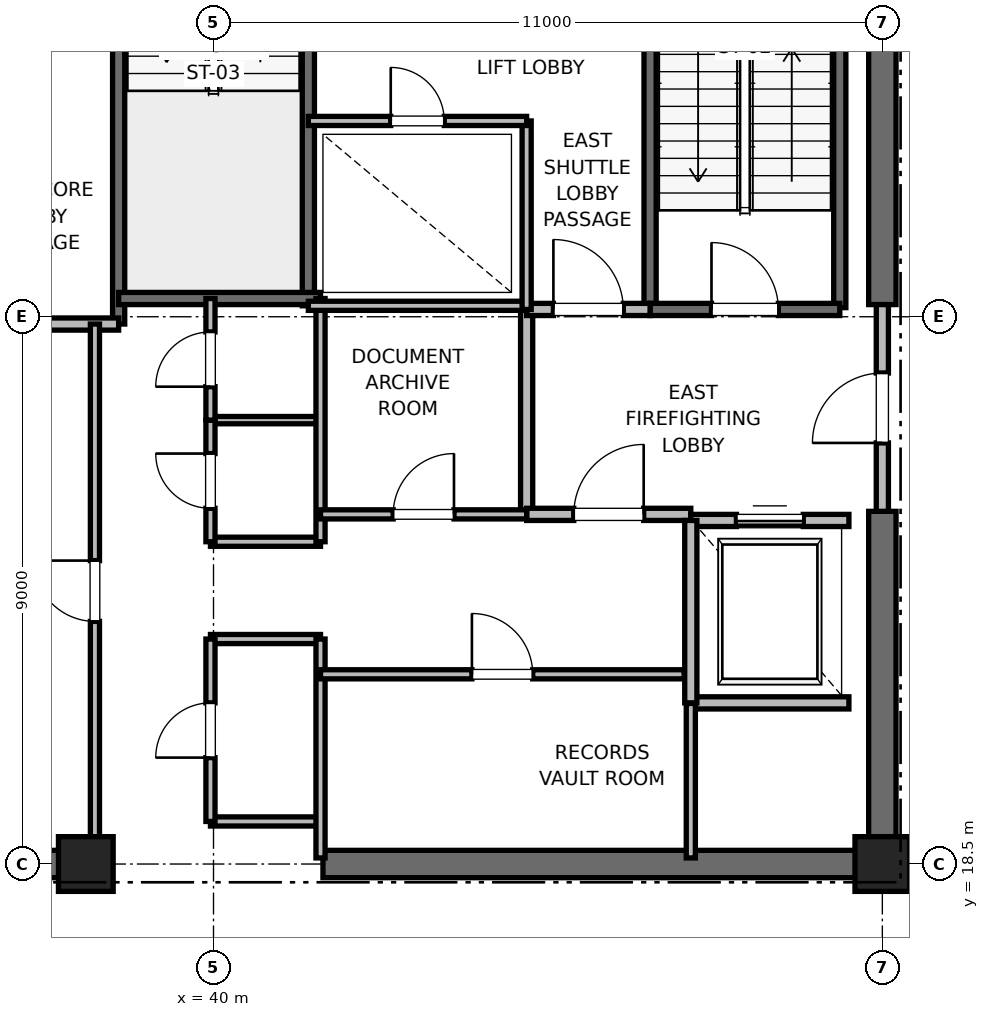
"""IFC4 building model, lengths in metres.
Left out: names, types, materials, properties, quantities, classifications, styles, units other than length and angle.
Written with IfcOpenShell. Run it as: python <this file> out.ifc"""

import sys

from ifc_helpers import new_model, si_unit, direction, frame, frame_2d, origin, origin_2d, place, context, subcontext, project, spatial, rectangle, extrude, element, fill, save


model = new_model("IFC4")
c1 = context("Model", 3, precision=1e-05, world=origin(), true_north=direction((0.0, 1.0)))
c2 = subcontext(c1, "Body", "Model", "MODEL_VIEW")
j1 = project(units=[si_unit("LENGTHUNIT", "METRE"), si_unit("PLANEANGLEUNIT", "RADIAN")], contexts=[c1])
p1 = place(None, origin())
s1 = spatial("IfcSite", under=j1, at=p1, CompositionType="ELEMENT")
p2 = place(p1, origin())
s2 = spatial("IfcBuilding", under=s1, at=p2, CompositionType="ELEMENT")
p3 = place(p2, frame((0.0, 0.0, 251.2)))
s3 = spatial("IfcBuildingStorey", under=s2, at=p3, CompositionType="ELEMENT", Elevation=251.2)
for number, where, z_axis, x_axis in (
    (1, (51.0, 18.5, 0.0), (0.0, 0.0, 1.0), (1.0, 0.0, 0.0)),
    (2, (37.9, 18.5, 0.0), (0.0, 0.0, 1.0), (1.0, 0.0, 0.0)),
):
    element("IfcColumn", number, at=place(p3, frame(where, z_axis=z_axis, x_axis=x_axis)), inside=s3, PredefinedType="PILASTER", context=c2, shape_type="SweptSolid", body=[
        extrude(rectangle(XDim=0.9, YDim=0.9, at=origin_2d()), origin(), (0.0, 0.0, 1.0), 4.0),
    ])
for number, where, z_axis, x_axis in (
    (3, (29.0, 18.5, 0.0), (0.0, 0.0, 1.0), (1.0, 0.0, 0.0)),
    (4, (41.8, 18.5, 0.0), (0.0, 0.0, 1.0), (1.0, 0.0, 0.0)),
):
    element("IfcWall", number, at=place(p3, frame(where, z_axis=z_axis, x_axis=x_axis)), inside=s3, PredefinedType="SHEAR", context=c2, shape_type="SweptSolid", body=[
        extrude(rectangle(XDim=9.2, YDim=0.45, at=frame_2d((4.6, 0.0))), origin(), (0.0, 0.0, 1.0), 3.785),
    ])
p4 = place(p3, frame((51.0, 18.5, 0.0), z_axis=(0.0, 0.0, 1.0), x_axis=(0.0, 1.0, 0.0)))
e5 = element("IfcWall", 5, at=p4, inside=s3, PredefinedType="SHEAR", context=c2, shape_type="SweptSolid", body=[
    extrude(rectangle(XDim=5.8, YDim=0.45, at=frame_2d((2.9, 0.0))), origin(), (0.0, 0.0, 1.0), 3.785),
])
p5 = place(p3, frame((51.0, 27.7, 0.0), z_axis=(0.0, 0.0, 1.0), x_axis=(0.0, 1.0, 0.0)))
e6 = element("IfcWall", 6, at=p5, inside=s3, PredefinedType="SHEAR", context=c2, shape_type="SweptSolid", body=[
    extrude(rectangle(XDim=8.8, YDim=0.45, at=frame_2d((4.4, 0.0))), origin(), (0.0, 0.0, 1.0), 3.785),
])
p6 = place(p3, frame((50.3, 27.65, 0.0), z_axis=(0.0, 0.0, 1.0), x_axis=(0.0, 1.0, 0.0)))
e7 = element("IfcWall", 7, at=p6, inside=s3, PredefinedType="SOLIDWALL", context=c2, shape_type="SweptSolid", body=[
    extrude(rectangle(XDim=8.15, YDim=0.2, at=frame_2d((4.075, 0.0))), origin(), (0.0, 0.0, 1.0), 3.785),
])
p7 = place(p3, frame((47.18, 27.62, 0.0), z_axis=(0.0, 0.0, 1.0), x_axis=(0.0, 1.0, 0.0)))
e8 = element("IfcWall", 8, at=p7, inside=s3, PredefinedType="SOLIDWALL", context=c2, shape_type="SweptSolid", body=[
    extrude(rectangle(XDim=8.18, YDim=0.2, at=frame_2d((4.09, 0.0))), origin(), (0.0, 0.0, 1.0), 3.785),
])
p8 = place(p3, frame((47.18, 27.62, 0.0), z_axis=(0.0, 0.0, 1.0), x_axis=(1.0, 0.0, 0.0)))
e9 = element("IfcWall", 9, at=p8, inside=s3, PredefinedType="SOLIDWALL", context=c2, shape_type="SweptSolid", body=[
    extrude(rectangle(XDim=3.12, YDim=0.2, at=frame_2d((1.56, 0.0))), origin(), (0.0, 0.0, 1.0), 3.785),
])
p9 = place(p8, frame((1.01, 0.0, 0.0)))
e10 = element("IfcOpeningElement", 10, at=p9, cuts=e9, PredefinedType="OPENING", context=c2, shape_type="SweptSolid", body=[
    extrude(rectangle(XDim=1.1, YDim=2.15, at=frame_2d((0.55, 1.075))), frame((0.0, 0.1, 0.0), z_axis=(0.0, -1.0, 0.0), x_axis=(1.0, 0.0, 0.0)), (0.0, 0.0, 1.0), 0.2),
])
p10 = place(p3, frame((38.44, 27.38, 0.0), z_axis=(0.0, 0.0, 1.0), x_axis=(0.0, 1.0, 0.0)))
e11 = element("IfcWall", 11, at=p10, inside=s3, PredefinedType="SOLIDWALL", context=c2, shape_type="SweptSolid", body=[
    extrude(rectangle(XDim=8.87, YDim=0.2, at=frame_2d((4.435, 0.0))), origin(), (0.0, 0.0, 1.0), 3.785),
])
p11 = place(p3, frame((41.56, 27.68, 0.0), z_axis=(0.0, 0.0, 1.0), x_axis=(0.0, 1.0, 0.0)))
e12 = element("IfcWall", 12, at=p11, inside=s3, PredefinedType="SOLIDWALL", context=c2, shape_type="SweptSolid", body=[
    extrude(rectangle(XDim=8.57, YDim=0.2, at=frame_2d((4.285, 0.0))), origin(), (0.0, 0.0, 1.0), 3.785),
])
p12 = place(p3, frame((38.44, 27.8, 0.0), z_axis=(0.0, 0.0, 1.0), x_axis=(1.0, 0.0, 0.0)))
e13 = element("IfcWall", 13, at=p12, inside=s3, PredefinedType="SOLIDWALL", context=c2, shape_type="SweptSolid", body=[
    extrude(rectangle(XDim=3.32, YDim=0.2, at=frame_2d((1.66, 0.0))), origin(), (0.0, 0.0, 1.0), 3.785),
])
p13 = place(p3, frame((32.82, 27.38, 0.0), z_axis=(0.0, 0.0, 1.0), x_axis=(1.0, 0.0, 0.0)))
e14 = element("IfcWall", 14, at=p13, inside=s3, PredefinedType="PARTITIONING", context=c2, shape_type="SweptSolid", body=[
    extrude(rectangle(XDim=5.62, YDim=0.2, at=frame_2d((2.81, 0.0))), origin(), (0.0, 0.0, 1.0), 3.785),
])
p14 = place(p3, frame((45.15, 24.25, 0.0), z_axis=(0.0, 0.0, 1.0), x_axis=(0.0, 1.0, 0.0)))
e15 = element("IfcWall", 15, at=p14, inside=s3, PredefinedType="PARTITIONING", context=c2, shape_type="SweptSolid", body=[
    extrude(rectangle(XDim=3.37, YDim=0.2, at=frame_2d((1.685, 0.0))), origin(), (0.0, 0.0, 1.0), 3.785),
])
p15 = place(p3, frame((45.15, 24.25, 0.0), z_axis=(0.0, 0.0, 1.0), x_axis=(1.0, 0.0, 0.0)))
e16 = element("IfcWall", 16, at=p15, inside=s3, PredefinedType="PARTITIONING", context=c2, shape_type="SweptSolid", body=[
    extrude(rectangle(XDim=2.7, YDim=0.2, at=frame_2d((1.35, 0.0))), origin(), (0.0, 0.0, 1.0), 3.785),
])
p16 = place(p15, frame((0.775, 0.0, 0.0)))
e17 = element("IfcOpeningElement", 17, at=p16, cuts=e16, PredefinedType="OPENING", context=c2, shape_type="SweptSolid", body=[
    extrude(rectangle(XDim=1.15, YDim=2.2, at=frame_2d((0.575, 1.1))), frame((0.0, 0.1, 0.0), z_axis=(0.0, -1.0, 0.0), x_axis=(1.0, 0.0, 0.0)), (0.0, 0.0, 1.0), 0.2),
])
p17 = place(p3, frame((45.15, 27.62, 0.0), z_axis=(0.0, 0.0, 1.0), x_axis=(1.0, 0.0, 0.0)))
e18 = element("IfcWall", 18, at=p17, inside=s3, PredefinedType="PARTITIONING", context=c2, shape_type="SweptSolid", body=[
    extrude(rectangle(XDim=2.03, YDim=0.2, at=frame_2d((1.015, 0.0))), origin(), (0.0, 0.0, 1.0), 3.785),
])
p18 = place(p17, frame((0.44, 0.0, 0.0)))
e19 = element("IfcOpeningElement", 19, at=p18, cuts=e18, PredefinedType="OPENING", context=c2, shape_type="SweptSolid", body=[
    extrude(rectangle(XDim=1.15, YDim=2.2, at=frame_2d((0.575, 1.1))), frame((0.0, 0.1, 0.0), z_axis=(0.0, -1.0, 0.0), x_axis=(1.0, 0.0, 0.0)), (0.0, 0.0, 1.0), 0.2),
])
p19 = place(p3, frame((51.0, 24.3, 0.0), z_axis=(0.0, 0.0, 1.0), x_axis=(0.0, 1.0, 0.0)))
e20 = element("IfcWall", 20, at=p19, inside=s3, PredefinedType="PARTITIONING", context=c2, shape_type="SweptSolid", body=[
    extrude(rectangle(XDim=3.4, YDim=0.2, at=frame_2d((1.7, 0.0))), origin(), (0.0, 0.0, 1.0), 2.865),
])
p20 = place(p19, frame((1.125, 0.0, 0.0)))
e21 = element("IfcOpeningElement", 21, at=p20, cuts=e20, PredefinedType="OPENING", context=c2, shape_type="SweptSolid", body=[
    extrude(rectangle(XDim=1.15, YDim=2.2, at=frame_2d((0.575, 1.1))), frame((0.0, 0.1, 0.0), z_axis=(0.0, -1.0, 0.0), x_axis=(1.0, 0.0, 0.0)), (0.0, 0.0, 1.0), 0.2),
])
p21 = place(p3, frame((47.85, 21.15, 0.0), z_axis=(0.0, 0.0, 1.0), x_axis=(1.0, 0.0, 0.0)))
e22 = element("IfcWall", 22, at=p21, inside=s3, PredefinedType="SOLIDWALL", context=c2, shape_type="SweptSolid", body=[
    extrude(rectangle(XDim=2.6, YDim=0.2, at=frame_2d((1.3, 0.0))), origin(), (0.0, 0.0, 1.0), 3.785),
])
p22 = place(p3, frame((50.45, 24.15, 0.0), z_axis=(0.0, 0.0, 1.0), x_axis=(-1.0, 0.0, 0.0)))
e23 = element("IfcWall", 23, at=p22, inside=s3, PredefinedType="SOLIDWALL", context=c2, shape_type="SweptSolid", body=[
    extrude(rectangle(XDim=2.6, YDim=0.2, at=frame_2d((1.3, 0.0))), origin(), (0.0, 0.0, 1.0), 2.865),
])
p23 = place(p22, frame((0.75, 0.0, 0.0)))
e24 = element("IfcOpeningElement", 24, at=p23, cuts=e23, PredefinedType="OPENING", context=c2, shape_type="SweptSolid", body=[
    extrude(rectangle(XDim=1.1, YDim=2.2, at=frame_2d((0.55, 1.1))), frame((0.0, 0.1, 0.0), z_axis=(0.0, -1.0, 0.0), x_axis=(1.0, 0.0, 0.0)), (0.0, 0.0, 1.0), 0.2),
])
p24 = place(p3, frame((47.85, 24.15, 0.0), z_axis=(0.0, 0.0, 1.0), x_axis=(0.0, -1.0, 0.0)))
e25 = element("IfcWall", 25, at=p24, inside=s3, PredefinedType="SOLIDWALL", context=c2, shape_type="SweptSolid", body=[
    extrude(rectangle(XDim=3.0, YDim=0.2, at=frame_2d((1.5, 0.0))), origin(), (0.0, 0.0, 1.0), 3.785),
])
for number, where, z_axis, x_axis in (
    (26, (39.95, 19.2, 0.0), (0.0, 0.0, 1.0), (1.0, 0.0, 0.0)),
    (27, (39.95, 22.2, 0.0), (0.0, 0.0, 1.0), (1.0, 0.0, 0.0)),
    (28, (39.95, 23.8, 0.0), (0.0, 0.0, 1.0), (1.0, 0.0, 0.0)),
):
    element("IfcWall", number, at=place(p3, frame(where, z_axis=z_axis, x_axis=x_axis)), inside=s3, PredefinedType="PARTITIONING", context=c2, shape_type="SweptSolid", body=[
        extrude(rectangle(XDim=1.81, YDim=0.15, at=frame_2d((0.905, 0.0))), origin(), (0.0, 0.0, 1.0), 2.85),
    ])
p25 = place(p3, frame((39.95, 25.8, 0.0), z_axis=(0.0, 0.0, 1.0), x_axis=(1.0, 0.0, 0.0)))
e29 = element("IfcWall", 29, at=p25, inside=s3, PredefinedType="PARTITIONING", context=c2, shape_type="SweptSolid", body=[
    extrude(rectangle(XDim=1.81, YDim=0.12, at=frame_2d((0.905, 0.0))), origin(), (0.0, 0.0, 1.0), 2.85),
])
p26 = place(p3, frame((41.76, 18.6, 0.0), z_axis=(0.0, 0.0, 1.0), x_axis=(0.0, 1.0, 0.0)))
e30 = element("IfcWall", 30, at=p26, inside=s3, PredefinedType="PARTITIONING", context=c2, shape_type="SweptSolid", body=[
    extrude(rectangle(XDim=3.6, YDim=0.15, at=frame_2d((1.8, 0.0))), origin(), (0.0, 0.0, 1.0), 2.85),
])
p27 = place(p3, frame((41.76, 23.8, 0.0), z_axis=(0.0, 0.0, 1.0), x_axis=(0.0, 1.0, 0.0)))
e31 = element("IfcWall", 31, at=p27, inside=s3, PredefinedType="PARTITIONING", context=c2, shape_type="SweptSolid", body=[
    extrude(rectangle(XDim=4.0, YDim=0.15, at=frame_2d((2.0, 0.0))), origin(), (0.0, 0.0, 1.0), 2.85),
])
p28 = place(p3, frame((39.95, 19.2, 0.0), z_axis=(0.0, 0.0, 1.0), x_axis=(0.0, 1.0, 0.0)))
e32 = element("IfcWall", 32, at=p28, inside=s3, PredefinedType="PARTITIONING", context=c2, shape_type="SweptSolid", body=[
    extrude(rectangle(XDim=3.0, YDim=0.15, at=frame_2d((1.5, 0.0))), origin(), (0.0, 0.0, 1.0), 2.85),
])
p29 = place(p28, frame((1.05, 0.0, 0.0)))
e33 = element("IfcOpeningElement", 33, at=p29, cuts=e32, PredefinedType="OPENING", context=c2, shape_type="SweptSolid", body=[
    extrude(rectangle(XDim=0.9, YDim=2.1, at=frame_2d((0.45, 1.05))), frame((0.0, 0.075, 0.0), z_axis=(0.0, -1.0, 0.0), x_axis=(1.0, 0.0, 0.0)), (0.0, 0.0, 1.0), 0.15),
])
p30 = place(p3, frame((39.95, 23.8, 0.0), z_axis=(0.0, 0.0, 1.0), x_axis=(0.0, 1.0, 0.0)))
e34 = element("IfcWall", 34, at=p30, inside=s3, PredefinedType="PARTITIONING", context=c2, shape_type="SweptSolid", body=[
    extrude(rectangle(XDim=2.0, YDim=0.15, at=frame_2d((1.0, 0.0))), origin(), (0.0, 0.0, 1.0), 2.85),
])
p31 = place(p30, frame((0.55, 0.0, 0.0)))
e35 = element("IfcOpeningElement", 35, at=p31, cuts=e34, PredefinedType="OPENING", context=c2, shape_type="SweptSolid", body=[
    extrude(rectangle(XDim=0.9, YDim=2.1, at=frame_2d((0.45, 1.05))), frame((0.0, 0.075, 0.0), z_axis=(0.0, -1.0, 0.0), x_axis=(1.0, 0.0, 0.0)), (0.0, 0.0, 1.0), 0.15),
])
p32 = place(p3, frame((39.95, 25.8, 0.0), z_axis=(0.0, 0.0, 1.0), x_axis=(0.0, 1.0, 0.0)))
e36 = element("IfcWall", 36, at=p32, inside=s3, PredefinedType="PARTITIONING", context=c2, shape_type="SweptSolid", body=[
    extrude(rectangle(XDim=2.0, YDim=0.15, at=frame_2d((1.0, 0.0))), origin(), (0.0, 0.0, 1.0), 2.85),
])
p33 = place(p32, frame((0.55, 0.0, 0.0)))
e37 = element("IfcOpeningElement", 37, at=p33, cuts=e36, PredefinedType="OPENING", context=c2, shape_type="SweptSolid", body=[
    extrude(rectangle(XDim=0.9, YDim=2.1, at=frame_2d((0.45, 1.05))), frame((0.0, 0.075, 0.0), z_axis=(0.0, -1.0, 0.0), x_axis=(1.0, 0.0, 0.0)), (0.0, 0.0, 1.0), 0.15),
])
p34 = place(p3, frame((38.05, 18.6, 0.0), z_axis=(0.0, 0.0, 1.0), x_axis=(0.0, 1.0, 0.0)))
e38 = element("IfcWall", 38, at=p34, inside=s3, PredefinedType="PARTITIONING", context=c2, shape_type="SweptSolid", body=[
    extrude(rectangle(XDim=8.78, YDim=0.15, at=frame_2d((4.39, 0.0))), origin(), (0.0, 0.0, 1.0), 2.85),
])
p35 = place(p34, frame((3.89, 0.0, 0.0)))
e39 = element("IfcOpeningElement", 39, at=p35, cuts=e38, PredefinedType="OPENING", context=c2, shape_type="SweptSolid", body=[
    extrude(rectangle(XDim=1.0, YDim=2.15, at=frame_2d((0.5, 1.075))), frame((0.0, 0.075, 0.0), z_axis=(0.0, -1.0, 0.0), x_axis=(1.0, 0.0, 0.0)), (0.0, 0.0, 1.0), 0.15),
])
p36 = place(p3, frame((41.56, 27.68, 0.0), z_axis=(0.0, 0.0, 1.0), x_axis=(1.0, 0.0, 0.0)))
e40 = element("IfcWall", 40, at=p36, inside=s3, PredefinedType="PARTITIONING", context=c2, shape_type="SweptSolid", body=[
    extrude(rectangle(XDim=3.59, YDim=0.15, at=frame_2d((1.795, 0.0))), origin(), (0.0, 0.0, 1.0), 2.85),
])
p37 = place(p3, frame((47.85, 18.6, 0.0), z_axis=(0.0, 0.0, 1.0), x_axis=(0.0, 1.0, 0.0)))
e41 = element("IfcWall", 41, at=p37, inside=s3, PredefinedType="PARTITIONING", context=c2, shape_type="SweptSolid", body=[
    extrude(rectangle(XDim=2.54, YDim=0.15, at=frame_2d((1.27, 0.0))), origin(), (0.0, 0.0, 1.0), 2.85),
])
p38 = place(p3, frame((41.76, 21.62, 0.0), z_axis=(0.0, 0.0, 1.0), x_axis=(1.0, 0.0, 0.0)))
e42 = element("IfcWall", 42, at=p38, inside=s3, PredefinedType="PARTITIONING", context=c2, shape_type="SweptSolid", body=[
    extrude(rectangle(XDim=5.98, YDim=0.15, at=frame_2d((2.99, 0.0))), origin(), (0.0, 0.0, 1.0), 2.85),
])
p39 = place(p38, frame((2.49, 0.0, 0.0)))
e43 = element("IfcOpeningElement", 43, at=p39, cuts=e42, PredefinedType="OPENING", context=c2, shape_type="SweptSolid", body=[
    extrude(rectangle(XDim=1.0, YDim=2.15, at=frame_2d((0.5, 1.075))), frame((0.0, 0.075, 0.0), z_axis=(0.0, -1.0, 0.0), x_axis=(1.0, 0.0, 0.0)), (0.0, 0.0, 1.0), 0.15),
])
p40 = place(p3, frame((41.76, 24.25, 0.0), z_axis=(0.0, 0.0, 1.0), x_axis=(1.0, 0.0, 0.0)))
e44 = element("IfcWall", 44, at=p40, inside=s3, PredefinedType="PARTITIONING", context=c2, shape_type="SweptSolid", body=[
    extrude(rectangle(XDim=3.39, YDim=0.15, at=frame_2d((1.695, 0.0))), origin(), (0.0, 0.0, 1.0), 2.85),
])
p41 = place(p40, frame((1.195, 0.0, 0.0)))
e45 = element("IfcOpeningElement", 45, at=p41, cuts=e44, PredefinedType="OPENING", context=c2, shape_type="SweptSolid", body=[
    extrude(rectangle(XDim=1.0, YDim=2.15, at=frame_2d((0.5, 1.075))), frame((0.0, 0.075, 0.0), z_axis=(0.0, -1.0, 0.0), x_axis=(1.0, 0.0, 0.0)), (0.0, 0.0, 1.0), 0.15),
])
p42 = place(p3, frame((45.15, 27.62, 0.0), z_axis=(0.0, 0.0, 1.0), x_axis=(0.0, 1.0, 0.0)))
e46 = element("IfcWall", 46, at=p42, inside=s3, PredefinedType="PARTITIONING", context=c2, shape_type="SweptSolid", body=[
    extrude(rectangle(XDim=3.1, YDim=0.15, at=frame_2d((1.55, 0.0))), origin(), (0.0, 0.0, 1.0), 2.85),
])
p43 = place(p3, frame((41.56, 30.72, 0.0), z_axis=(0.0, 0.0, 1.0), x_axis=(1.0, 0.0, 0.0)))
e47 = element("IfcWall", 47, at=p43, inside=s3, PredefinedType="PARTITIONING", context=c2, shape_type="SweptSolid", body=[
    extrude(rectangle(XDim=3.59, YDim=0.15, at=frame_2d((1.795, 0.0))), origin(), (0.0, 0.0, 1.0), 2.85),
])
p44 = place(p43, frame((1.355, 0.0, 0.0)))
e48 = element("IfcOpeningElement", 48, at=p44, cuts=e47, PredefinedType="OPENING", context=c2, shape_type="SweptSolid", body=[
    extrude(rectangle(XDim=0.88, YDim=2.1, at=frame_2d((0.44, 1.05))), frame((0.0, 0.075, 0.0), z_axis=(0.0, -1.0, 0.0), x_axis=(1.0, 0.0, 0.0)), (0.0, 0.0, 1.0), 0.15),
])
p45 = place(p9, origin())
e49 = element("IfcDoor", 49, at=p45, inside=s3, OperationType="SINGLE_SWING_LEFT", PredefinedType="DOOR", context=c2, shape_type="SweptSolid", body=[
    extrude(rectangle(XDim=1.1, YDim=2.15, at=frame_2d((0.55, 1.075))), frame((0.0, 0.025, 0.0), z_axis=(0.0, -1.0, 0.0), x_axis=(1.0, 0.0, 0.0)), (0.0, 0.0, 1.0), 0.05),
])
fill(e10, e49)
p46 = place(p16, origin())
e50 = element("IfcDoor", 50, at=p46, inside=s3, OperationType="SINGLE_SWING_RIGHT", PredefinedType="DOOR", context=c2, shape_type="SweptSolid", body=[
    extrude(rectangle(XDim=1.15, YDim=2.2, at=frame_2d((0.575, 1.1))), frame((0.0, 0.025, 0.0), z_axis=(0.0, -1.0, 0.0), x_axis=(1.0, 0.0, 0.0)), (0.0, 0.0, 1.0), 0.05),
])
fill(e17, e50)
p47 = place(p18, origin())
e51 = element("IfcDoor", 51, at=p47, inside=s3, OperationType="SINGLE_SWING_LEFT", PredefinedType="DOOR", context=c2, shape_type="SweptSolid", body=[
    extrude(rectangle(XDim=1.15, YDim=2.2, at=frame_2d((0.575, 1.1))), frame((0.0, 0.025, 0.0), z_axis=(0.0, -1.0, 0.0), x_axis=(1.0, 0.0, 0.0)), (0.0, 0.0, 1.0), 0.05),
])
fill(e19, e51)
p48 = place(p20, origin())
e52 = element("IfcDoor", 52, at=p48, inside=s3, OperationType="SINGLE_SWING_LEFT", PredefinedType="DOOR", context=c2, shape_type="SweptSolid", body=[
    extrude(rectangle(XDim=1.15, YDim=2.2, at=frame_2d((0.575, 1.1))), frame((0.0, 0.025, 0.0), z_axis=(0.0, -1.0, 0.0), x_axis=(1.0, 0.0, 0.0)), (0.0, 0.0, 1.0), 0.05),
])
fill(e21, e52)
p49 = place(p23, origin())
e53 = element("IfcDoor", 53, at=p49, inside=s3, OperationType="SLIDING_TO_RIGHT", PredefinedType="DOOR", context=c2, shape_type="SweptSolid", body=[
    extrude(rectangle(XDim=1.1, YDim=2.2, at=frame_2d((0.55, 1.1))), frame((0.0, 0.025, 0.0), z_axis=(0.0, -1.0, 0.0), x_axis=(1.0, 0.0, 0.0)), (0.0, 0.0, 1.0), 0.05),
])
fill(e24, e53)
p50 = place(p29, origin())
e54 = element("IfcDoor", 54, at=p50, inside=s3, OperationType="SINGLE_SWING_LEFT", PredefinedType="DOOR", context=c2, shape_type="SweptSolid", body=[
    extrude(rectangle(XDim=0.9, YDim=2.1, at=frame_2d((0.45, 1.05))), frame((0.0, 0.025, 0.0), z_axis=(0.0, -1.0, 0.0), x_axis=(1.0, 0.0, 0.0)), (0.0, 0.0, 1.0), 0.05),
])
fill(e33, e54)
p51 = place(p31, origin())
e55 = element("IfcDoor", 55, at=p51, inside=s3, OperationType="SINGLE_SWING_RIGHT", PredefinedType="DOOR", context=c2, shape_type="SweptSolid", body=[
    extrude(rectangle(XDim=0.9, YDim=2.1, at=frame_2d((0.45, 1.05))), frame((0.0, 0.025, 0.0), z_axis=(0.0, -1.0, 0.0), x_axis=(1.0, 0.0, 0.0)), (0.0, 0.0, 1.0), 0.05),
])
fill(e35, e55)
p52 = place(p33, origin())
e56 = element("IfcDoor", 56, at=p52, inside=s3, OperationType="SINGLE_SWING_LEFT", PredefinedType="DOOR", context=c2, shape_type="SweptSolid", body=[
    extrude(rectangle(XDim=0.9, YDim=2.1, at=frame_2d((0.45, 1.05))), frame((0.0, 0.025, 0.0), z_axis=(0.0, -1.0, 0.0), x_axis=(1.0, 0.0, 0.0)), (0.0, 0.0, 1.0), 0.05),
])
fill(e37, e56)
p53 = place(p35, origin())
e57 = element("IfcDoor", 57, at=p53, inside=s3, OperationType="SINGLE_SWING_RIGHT", PredefinedType="DOOR", context=c2, shape_type="SweptSolid", body=[
    extrude(rectangle(XDim=1.0, YDim=2.15, at=frame_2d((0.5, 1.075))), frame((0.0, 0.025, 0.0), z_axis=(0.0, -1.0, 0.0), x_axis=(1.0, 0.0, 0.0)), (0.0, 0.0, 1.0), 0.05),
])
fill(e39, e57)
p54 = place(p39, origin())
e58 = element("IfcDoor", 58, at=p54, inside=s3, OperationType="SINGLE_SWING_LEFT", PredefinedType="DOOR", context=c2, shape_type="SweptSolid", body=[
    extrude(rectangle(XDim=1.0, YDim=2.15, at=frame_2d((0.5, 1.075))), frame((0.0, 0.025, 0.0), z_axis=(0.0, -1.0, 0.0), x_axis=(1.0, 0.0, 0.0)), (0.0, 0.0, 1.0), 0.05),
])
fill(e43, e58)
p55 = place(p41, origin())
e59 = element("IfcDoor", 59, at=p55, inside=s3, OperationType="SINGLE_SWING_RIGHT", PredefinedType="DOOR", context=c2, shape_type="SweptSolid", body=[
    extrude(rectangle(XDim=1.0, YDim=2.15, at=frame_2d((0.5, 1.075))), frame((0.0, 0.025, 0.0), z_axis=(0.0, -1.0, 0.0), x_axis=(1.0, 0.0, 0.0)), (0.0, 0.0, 1.0), 0.05),
])
fill(e45, e59)
p56 = place(p44, origin())
e60 = element("IfcDoor", 60, at=p56, inside=s3, OperationType="SINGLE_SWING_LEFT", PredefinedType="DOOR", context=c2, shape_type="SweptSolid", body=[
    extrude(rectangle(XDim=0.88, YDim=2.1, at=frame_2d((0.44, 1.05))), frame((0.0, 0.025, 0.0), z_axis=(0.0, -1.0, 0.0), x_axis=(1.0, 0.0, 0.0)), (0.0, 0.0, 1.0), 0.05),
])
fill(e48, e60)
save(model, sys.argv[1])
